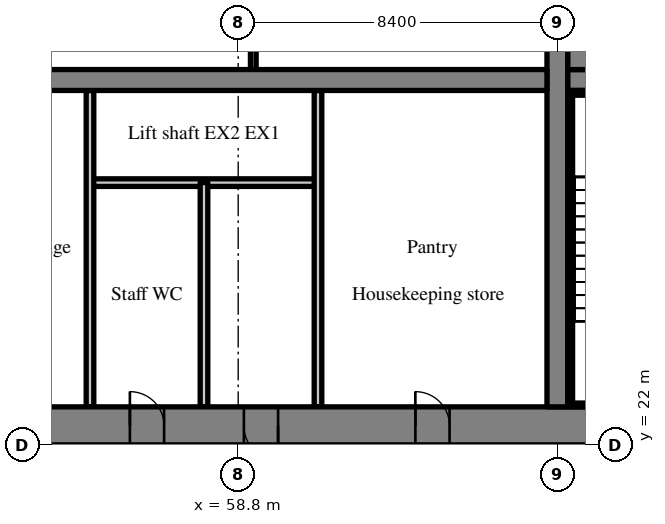
"""IFC4 building model, lengths in metres.
Left out: names, types, materials, properties, quantities, classifications, styles, units other than length and angle.
Written with IfcOpenShell. Run it as: python <this file> out.ifc"""

import sys

from ifc_helpers import new_model, si_unit, direction, frame, frame_2d, origin, place, context, subcontext, project, spatial, rectangle, extrude, source, transform, mapped, element, fill, save


model = new_model("IFC4")
c1 = context("Model", 3, precision=1e-05, world=origin(), true_north=direction((0.0, 1.0)))
c2 = subcontext(c1, "Body", "Model", "MODEL_VIEW")
j1 = project(units=[si_unit("LENGTHUNIT", "METRE"), si_unit("PLANEANGLEUNIT", "RADIAN")], contexts=[c1])
p1 = place(None, origin())
s1 = spatial("IfcSite", under=j1, at=p1, CompositionType="ELEMENT")
p2 = place(p1, origin())
s2 = spatial("IfcBuilding", under=s1, at=p2, CompositionType="ELEMENT")
p3 = place(p2, frame((0.0, 0.0, 46.8)))
s3 = spatial("IfcBuildingStorey", under=s2, at=p3, CompositionType="ELEMENT", Elevation=46.8)
m1 = source(origin(), c2, "Body", "SweptSolid", [
    extrude(rectangle(XDim=50.4, YDim=1.0, at=frame_2d((25.2, 0.0))), origin(), (0.0, 0.0, 1.0), 3.52),
])
p4 = place(p3, frame((25.2, 22.5, 0.0), z_axis=(0.0, 0.0, 1.0), x_axis=(1.0, 0.0, 0.0)))
e1 = element("IfcWall", 1, at=p4, inside=s3, PredefinedType="SHEAR", context=c2, shape_type="MappedRepresentation", body=[
    mapped(m1, transform((0.0, 0.0, 0.0), scale=1.0)),
])
m2 = source(origin(), c2, "Body", "SweptSolid", [
    extrude(rectangle(XDim=1.8, YDim=2.1, at=frame_2d((0.9, 1.05))), frame((0.0, 0.51, 0.0), z_axis=(0.0, -1.0, 0.0), x_axis=(1.0, 0.0, 0.0)), (0.0, 0.0, 1.0), 1.02),
])
p5 = place(p4, frame((15.9, 0.0, 0.0)))
e2 = element("IfcOpeningElement", 2, at=p5, cuts=e1, PredefinedType="OPENING", context=c2, shape_type="MappedRepresentation", body=[
    mapped(m2, transform((0.0, 0.0, 0.0), scale=1.0)),
])
m3 = source(origin(), c2, "Body", "SweptSolid", [
    extrude(rectangle(XDim=1.2, YDim=2.1, at=frame_2d((0.6, 1.05))), frame((0.0, 0.51, 0.0), z_axis=(0.0, -1.0, 0.0), x_axis=(1.0, 0.0, 0.0)), (0.0, 0.0, 1.0), 1.02),
])
p6 = place(p4, frame((26.987, 0.0, 0.0)))
e3 = element("IfcOpeningElement", 3, at=p6, cuts=e1, PredefinedType="OPENING", context=c2, shape_type="MappedRepresentation", body=[
    mapped(m3, transform((0.0, 0.0, 0.0), scale=1.0)),
])
m4 = source(origin(), c2, "Body", "SweptSolid", [
    extrude(rectangle(XDim=0.9, YDim=2.1, at=frame_2d((0.45, 1.05))), frame((0.0, 0.51, 0.0), z_axis=(0.0, -1.0, 0.0), x_axis=(1.0, 0.0, 0.0)), (0.0, 0.0, 1.0), 1.02),
])
p7 = place(p4, frame((33.75, 0.0, 0.0)))
e4 = element("IfcOpeningElement", 4, at=p7, cuts=e1, PredefinedType="OPENING", context=c2, shape_type="MappedRepresentation", body=[
    mapped(m4, transform((0.0, 0.0, 0.0), scale=1.0)),
])
p8 = place(p4, frame((30.75, 0.0, 0.0)))
e5 = element("IfcOpeningElement", 5, at=p8, cuts=e1, PredefinedType="OPENING", context=c2, shape_type="MappedRepresentation", body=[
    mapped(m4, transform((0.0, 0.0, 0.0), scale=1.0)),
])
p9 = place(p4, frame((38.262, 0.0, 0.0)))
e6 = element("IfcOpeningElement", 6, at=p9, cuts=e1, PredefinedType="OPENING", context=c2, shape_type="MappedRepresentation", body=[
    mapped(m4, transform((0.0, 0.0, 0.0), scale=1.0)),
])
p10 = place(p4, frame((6.438, 0.0, 0.0)))
e7 = element("IfcOpeningElement", 7, at=p10, cuts=e1, PredefinedType="OPENING", context=c2, shape_type="MappedRepresentation", body=[
    mapped(m3, transform((0.0, 0.0, 0.0), scale=1.0)),
])
p11 = place(p4, frame((47.725, 0.0, 0.0)))
e8 = element("IfcOpeningElement", 8, at=p11, cuts=e1, PredefinedType="OPENING", context=c2, shape_type="MappedRepresentation", body=[
    mapped(m3, transform((0.0, 0.0, 0.0), scale=1.0)),
])
m5 = source(origin(), c2, "Body", "SweptSolid", [
    extrude(rectangle(XDim=18.0, YDim=0.55, at=frame_2d((9.0, 0.0))), origin(), (0.0, 0.0, 1.0), 3.52),
])
p12 = place(p3, frame((67.2, 23.0, 0.0), z_axis=(0.0, 0.0, 1.0), x_axis=(0.0, 1.0, 0.0)))
e9 = element("IfcWall", 9, at=p12, inside=s3, PredefinedType="SHEAR", context=c2, shape_type="MappedRepresentation", body=[
    mapped(m5, transform((0.0, 0.0, 0.0), scale=1.0)),
])
m6 = source(origin(), c2, "Body", "SweptSolid", [
    extrude(rectangle(XDim=16.25, YDim=0.55, at=frame_2d((8.125, 0.0))), origin(), (0.0, 0.0, 1.0), 3.52),
])
p13 = place(p3, frame((50.675, 31.6, 0.0), z_axis=(0.0, 0.0, 1.0), x_axis=(1.0, 0.0, 0.0)))
e10 = element("IfcWall", 10, at=p13, inside=s3, PredefinedType="SHEAR", context=c2, shape_type="MappedRepresentation", body=[
    mapped(m6, transform((0.0, 0.0, 0.0), scale=1.0)),
])
m7 = source(origin(), c2, "Body", "SweptSolid", [
    extrude(rectangle(XDim=1.0, YDim=2.1, at=frame_2d((0.5, 1.05))), frame((0.0, 0.285, 0.0), z_axis=(0.0, -1.0, 0.0), x_axis=(1.0, 0.0, 0.0)), (0.0, 0.0, 1.0), 0.57),
])
p14 = place(p13, frame((0.562, 0.0, 0.0)))
e11 = element("IfcOpeningElement", 11, at=p14, cuts=e10, PredefinedType="OPENING", context=c2, shape_type="MappedRepresentation", body=[
    mapped(m7, transform((0.0, 0.0, 0.0), scale=1.0)),
])
m8 = source(origin(), c2, "Body", "SweptSolid", [
    extrude(rectangle(XDim=7.125, YDim=0.55, at=frame_2d((3.562, 0.0))), origin(), (0.0, 0.0, 1.0), 3.52),
])
p15 = place(p3, frame((67.475, 31.6, 0.0), z_axis=(0.0, 0.0, 1.0), x_axis=(1.0, 0.0, 0.0)))
e12 = element("IfcWall", 12, at=p15, inside=s3, PredefinedType="SHEAR", context=c2, shape_type="MappedRepresentation", body=[
    mapped(m8, transform((0.0, 0.0, 0.0), scale=1.0)),
])
m9 = source(origin(), c2, "Body", "SweptSolid", [
    extrude(rectangle(XDim=1.1, YDim=2.1, at=frame_2d((0.55, 1.05))), frame((0.0, 0.285, 0.0), z_axis=(0.0, -1.0, 0.0), x_axis=(1.0, 0.0, 0.0)), (0.0, 0.0, 1.0), 0.57),
])
p16 = place(p15, frame((5.5, 0.0, 0.0)))
e13 = element("IfcOpeningElement", 13, at=p16, cuts=e12, PredefinedType="OPENING", context=c2, shape_type="MappedRepresentation", body=[
    mapped(m9, transform((0.0, 0.0, 0.0), scale=1.0)),
])
m10 = source(origin(), c2, "Body", "SweptSolid", [
    extrude(rectangle(XDim=6.0, YDim=0.2, at=frame_2d((3.0, 0.0))), origin(), (0.0, 0.0, 1.0), 3.52),
])
p17 = place(p3, frame((60.9, 28.9, 0.0), z_axis=(0.0, 0.0, 1.0), x_axis=(-1.0, 0.0, 0.0)))
e14 = element("IfcWall", 14, at=p17, inside=s3, PredefinedType="SOLIDWALL", context=c2, shape_type="MappedRepresentation", body=[
    mapped(m10, transform((0.0, 0.0, 0.0), scale=1.0)),
])
m11 = source(origin(), c2, "Body", "SweptSolid", [
    extrude(rectangle(XDim=8.325, YDim=0.2, at=frame_2d((4.163, 0.0))), origin(), (0.0, 0.0, 1.0), 3.52),
])
for number, where, z_axis, x_axis in (
    (15, (54.9, 23.0, 0.0), (0.0, 0.0, 1.0), (0.0, 1.0, 0.0)),
    (16, (60.9, 23.0, 0.0), (0.0, 0.0, 1.0), (0.0, 1.0, 0.0)),
):
    element("IfcWall", number, at=place(p3, frame(where, z_axis=z_axis, x_axis=x_axis)), inside=s3, PredefinedType="PARTITIONING", context=c2, shape_type="MappedRepresentation", body=[
        mapped(m11, transform((0.0, 0.0, 0.0), scale=1.0)),
    ])
m12 = source(origin(), c2, "Body", "SweptSolid", [
    extrude(rectangle(XDim=5.9, YDim=0.2, at=frame_2d((2.95, 0.0))), origin(), (0.0, 0.0, 1.0), 3.52),
])
p18 = place(p3, frame((57.9, 23.0, 0.0), z_axis=(0.0, 0.0, 1.0), x_axis=(0.0, 1.0, 0.0)))
e17 = element("IfcWall", 17, at=p18, inside=s3, PredefinedType="PARTITIONING", context=c2, shape_type="MappedRepresentation", body=[
    mapped(m12, transform((0.0, 0.0, 0.0), scale=1.0)),
])
m13 = source(origin(), c2, "Body", "SweptSolid", [
    extrude(rectangle(XDim=3.125, YDim=0.15, at=frame_2d((1.562, 0.0))), origin(), (0.0, 0.0, 1.0), 3.52),
])
p19 = place(p3, frame((59.197, 31.875, 0.0), z_axis=(0.0, 0.0, 1.0), x_axis=(0.0, 1.0, 0.0)))
e18 = element("IfcWall", 18, at=p19, inside=s3, PredefinedType="PARTITIONING", context=c2, shape_type="MappedRepresentation", body=[
    mapped(m13, transform((0.0, 0.0, 0.0), scale=1.0)),
])
m14 = source(origin(), c2, "Body", "SweptSolid", [
    extrude(rectangle(XDim=4.775, YDim=0.1, at=frame_2d((2.387, 0.0))), origin(), (0.0, 0.0, 1.0), 3.52),
])
p20 = place(p3, frame((67.475, 23.05, 0.0), z_axis=(0.0, 0.0, 1.0), x_axis=(1.0, 0.0, 0.0)))
e19 = element("IfcWall", 19, at=p20, inside=s3, PredefinedType="SOLIDWALL", context=c2, shape_type="MappedRepresentation", body=[
    mapped(m14, transform((0.0, 0.0, 0.0), scale=1.0)),
])
m15 = source(origin(), c2, "Body", "SweptSolid", [
    extrude(rectangle(XDim=4.775, YDim=0.125, at=frame_2d((2.387, 0.0))), origin(), (0.0, 0.0, 1.0), 3.52),
])
p21 = place(p3, frame((67.475, 31.262, 0.0), z_axis=(0.0, 0.0, 1.0), x_axis=(1.0, 0.0, 0.0)))
e20 = element("IfcWall", 20, at=p21, inside=s3, PredefinedType="SOLIDWALL", context=c2, shape_type="MappedRepresentation", body=[
    mapped(m15, transform((0.0, 0.0, 0.0), scale=1.0)),
])
m16 = source(origin(), c2, "Body", "SweptSolid", [
    extrude(rectangle(XDim=8.1, YDim=0.125, at=frame_2d((4.05, 0.0))), origin(), (0.0, 0.0, 1.0), 3.52),
])
p22 = place(p3, frame((67.537, 23.1, 0.0), z_axis=(0.0, 0.0, 1.0), x_axis=(0.0, 1.0, 0.0)))
e21 = element("IfcWall", 21, at=p22, inside=s3, PredefinedType="SOLIDWALL", context=c2, shape_type="MappedRepresentation", body=[
    mapped(m16, transform((0.0, 0.0, 0.0), scale=1.0)),
])
m17 = source(origin(), c2, "Body", "SweptSolid", [
    extrude(rectangle(XDim=4.775, YDim=0.925, at=frame_2d((2.387, 0.0))), origin(), (0.0, 0.0, 1.0), 3.52),
])
p23 = place(p3, frame((67.475, 32.337, 0.0), z_axis=(0.0, 0.0, 1.0), x_axis=(1.0, 0.0, 0.0)))
e22 = element("IfcWall", 22, at=p23, inside=s3, PredefinedType="SOLIDWALL", context=c2, shape_type="MappedRepresentation", body=[
    mapped(m17, transform((0.0, 0.0, 0.0), scale=1.0)),
])
m18 = source(origin(), c2, "Body", "SweptSolid", [
    extrude(rectangle(XDim=0.9, YDim=2.1, at=frame_2d((0.45, 1.05))), frame((0.0, 0.375, 0.0), z_axis=(0.0, -1.0, 0.0), x_axis=(1.0, 0.0, 0.0)), (0.0, 0.0, 1.0), 0.05),
])
p24 = place(p7, origin())
e23 = element("IfcDoor", 23, at=p24, inside=s3, OperationType="SINGLE_SWING_RIGHT", PredefinedType="DOOR", context=c2, shape_type="MappedRepresentation", body=[
    mapped(m18, transform((0.0, 0.0, 0.0), scale=1.0)),
])
fill(e4, e23)
p25 = place(p8, origin())
e24 = element("IfcDoor", 24, at=p25, inside=s3, OperationType="SINGLE_SWING_LEFT", PredefinedType="DOOR", context=c2, shape_type="MappedRepresentation", body=[
    mapped(m18, transform((0.0, 0.0, 0.0), scale=1.0)),
])
fill(e5, e24)
p26 = place(p9, origin())
e25 = element("IfcDoor", 25, at=p26, inside=s3, OperationType="SINGLE_SWING_LEFT", PredefinedType="DOOR", context=c2, shape_type="MappedRepresentation", body=[
    mapped(m18, transform((0.0, 0.0, 0.0), scale=1.0)),
])
fill(e6, e25)
save(model, sys.argv[1])
